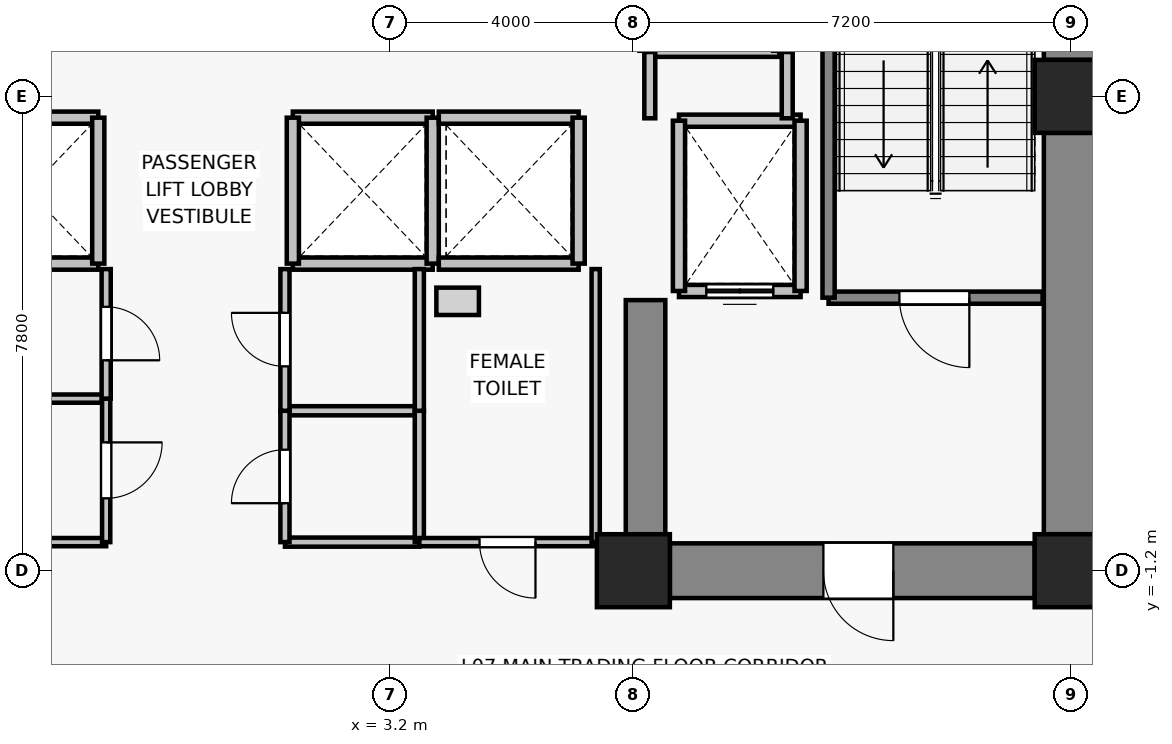
"""IFC4 building model, lengths in metres.
Left out: names, types, materials, properties, quantities, classifications, styles, units other than length and angle.
Written with IfcOpenShell. Run it as: python <this file> out.ifc"""

import sys

from ifc_helpers import new_model, si_unit, direction, frame, frame_2d, origin, origin_2d, place, context, subcontext, project, spatial, rectangle, extrude, source, transform, mapped, element, fill, save


model = new_model("IFC4")
c1 = context("Model", 3, precision=1e-05, world=origin(), true_north=direction((0.0, 1.0)))
c2 = subcontext(c1, "Body", "Model", "MODEL_VIEW")
j1 = project(units=[si_unit("LENGTHUNIT", "METRE"), si_unit("PLANEANGLEUNIT", "RADIAN")], contexts=[c1])
p1 = place(None, origin())
s1 = spatial("IfcSite", under=j1, at=p1, CompositionType="ELEMENT")
p2 = place(p1, origin())
s2 = spatial("IfcBuilding", under=s1, at=p2, CompositionType="ELEMENT")
p3 = place(p2, frame((0.0, 0.0, 30.7)))
s3 = spatial("IfcBuildingStorey", under=s2, at=p3, CompositionType="ELEMENT", Elevation=30.7)
for number, where, z_axis, x_axis in (
    (1, (7.2, -1.2, 0.0), (0.0, 0.0, 1.0), (1.0, 0.0, 0.0)),
    (2, (14.4, -1.2, 0.0), (0.0, 0.0, 1.0), (1.0, 0.0, 0.0)),
    (3, (14.4, 6.6, 0.0), (0.0, 0.0, 1.0), (1.0, 0.0, 0.0)),
):
    element("IfcColumn", number, at=place(p3, frame(where, z_axis=z_axis, x_axis=x_axis)), inside=s3, PredefinedType="COLUMN", context=c2, shape_type="SweptSolid", body=[
        extrude(rectangle(XDim=1.2, YDim=1.2, at=origin_2d()), origin(), (0.0, 0.0, 1.0), 3.3),
    ])
p4 = place(p3, frame((14.4, -0.6, 0.0), z_axis=(0.0, 0.0, 1.0), x_axis=(0.0, 1.0, 0.0)))
e4 = element("IfcWall", 4, at=p4, inside=s3, PredefinedType="SHEAR", context=c2, shape_type="SweptSolid", body=[
    extrude(rectangle(XDim=6.6, YDim=0.9, at=frame_2d((3.3, 0.0))), origin(), (0.0, 0.0, 1.0), 3.075),
])
p5 = place(p3, frame((14.4, 7.2, 0.0), z_axis=(0.0, 0.0, 1.0), x_axis=(0.0, 1.0, 0.0)))
e5 = element("IfcWall", 5, at=p5, inside=s3, PredefinedType="SHEAR", context=c2, shape_type="SweptSolid", body=[
    extrude(rectangle(XDim=5.7, YDim=0.9, at=frame_2d((2.85, 0.0))), origin(), (0.0, 0.0, 1.0), 3.075),
])
p6 = place(p3, frame((13.8, -1.2, 0.0), z_axis=(0.0, 0.0, 1.0), x_axis=(-1.0, 0.0, 0.0)))
e6 = element("IfcWall", 6, at=p6, inside=s3, PredefinedType="SHEAR", context=c2, shape_type="SweptSolid", body=[
    extrude(rectangle(XDim=6.0, YDim=0.9, at=frame_2d((3.0, 0.0))), origin(), (0.0, 0.0, 1.0), 3.075),
])
p7 = place(p6, frame((2.325, 0.0, 0.0)))
e7 = element("IfcOpeningElement", 7, at=p7, cuts=e6, PredefinedType="OPENING", context=c2, shape_type="SweptSolid", body=[
    extrude(rectangle(XDim=1.15, YDim=2.15, at=frame_2d((0.575, 1.075))), frame((0.0, 0.46, 0.0), z_axis=(0.0, -1.0, 0.0), x_axis=(1.0, 0.0, 0.0)), (0.0, 0.0, 1.0), 0.92),
])
p8 = place(p3, frame((7.4, -0.75, 0.0), z_axis=(0.0, 0.0, 1.0), x_axis=(0.0, 1.0, 0.0)))
e8 = element("IfcWall", 8, at=p8, inside=s3, PredefinedType="SHEAR", context=c2, shape_type="SweptSolid", body=[
    extrude(rectangle(XDim=4.0, YDim=0.65, at=frame_2d((2.0, 0.0))), origin(), (0.0, 0.0, 1.0), 3.075),
])
p9 = place(p3, frame((9.95, 3.4, 0.0), z_axis=(0.0, 0.0, 1.0), x_axis=(-1.0, 0.0, 0.0)))
e9 = element("IfcWall", 9, at=p9, inside=s3, PredefinedType="SOLIDWALL", context=c2, shape_type="SweptSolid", body=[
    extrude(rectangle(XDim=2.0, YDim=0.2, at=frame_2d((1.0, 0.0))), origin(), (0.0, 0.0, 1.0), 3.075),
])
p10 = place(p9, frame((0.45, 0.0, 0.0)))
e10 = element("IfcOpeningElement", 10, at=p10, cuts=e9, PredefinedType="OPENING", context=c2, shape_type="SweptSolid", body=[
    extrude(rectangle(XDim=1.1, YDim=2.2, at=frame_2d((0.55, 1.1))), frame((0.0, 0.11, 0.0), z_axis=(0.0, -1.0, 0.0), x_axis=(1.0, 0.0, 0.0)), (0.0, 0.0, 1.0), 0.22),
])
p11 = place(p3, frame((7.95, 6.2, 0.0), z_axis=(0.0, 0.0, 1.0), x_axis=(1.0, 0.0, 0.0)))
e11 = element("IfcWall", 11, at=p11, inside=s3, PredefinedType="SOLIDWALL", context=c2, shape_type="SweptSolid", body=[
    extrude(rectangle(XDim=2.0, YDim=0.2, at=frame_2d((1.0, 0.0))), origin(), (0.0, 0.0, 1.0), 3.075),
])
for number, where, z_axis, x_axis in (
    (12, (7.95, 3.4, 0.0), (0.0, 0.0, 1.0), (0.0, 1.0, 0.0)),
    (13, (9.95, 6.2, 0.0), (0.0, 0.0, 1.0), (0.0, -1.0, 0.0)),
):
    element("IfcWall", number, at=place(p3, frame(where, z_axis=z_axis, x_axis=x_axis)), inside=s3, PredefinedType="SOLIDWALL", context=c2, shape_type="SweptSolid", body=[
        extrude(rectangle(XDim=2.8, YDim=0.2, at=frame_2d((1.4, 0.0))), origin(), (0.0, 0.0, 1.0), 3.075),
    ])
for number, where, z_axis, x_axis in (
    (14, (-1.6, 3.85, 0.0), (0.0, 0.0, 1.0), (-1.0, 0.0, 0.0)),
    (15, (-3.9, 6.25, 0.0), (0.0, 0.0, 1.0), (1.0, 0.0, 0.0)),
):
    element("IfcWall", number, at=place(p3, frame(where, z_axis=z_axis, x_axis=x_axis)), inside=s3, PredefinedType="SOLIDWALL", context=c2, shape_type="SweptSolid", body=[
        extrude(rectangle(XDim=2.3, YDim=0.2, at=frame_2d((1.15, 0.0))), origin(), (0.0, 0.0, 1.0), 3.075),
    ])
p12 = place(p3, frame((-1.6, 6.25, 0.0), z_axis=(0.0, 0.0, 1.0), x_axis=(0.0, -1.0, 0.0)))
e16 = element("IfcWall", 16, at=p12, inside=s3, PredefinedType="SOLIDWALL", context=c2, shape_type="SweptSolid", body=[
    extrude(rectangle(XDim=2.4, YDim=0.2, at=frame_2d((1.2, 0.0))), origin(), (0.0, 0.0, 1.0), 3.075),
])
for number, where, z_axis, x_axis in (
    (17, (3.9, 3.85, 0.0), (0.0, 0.0, 1.0), (-1.0, 0.0, 0.0)),
    (18, (1.6, 6.25, 0.0), (0.0, 0.0, 1.0), (1.0, 0.0, 0.0)),
):
    element("IfcWall", number, at=place(p3, frame(where, z_axis=z_axis, x_axis=x_axis)), inside=s3, PredefinedType="SOLIDWALL", context=c2, shape_type="SweptSolid", body=[
        extrude(rectangle(XDim=2.3, YDim=0.2, at=frame_2d((1.15, 0.0))), origin(), (0.0, 0.0, 1.0), 3.075),
    ])
for number, where, z_axis, x_axis in (
    (19, (1.6, 3.85, 0.0), (0.0, 0.0, 1.0), (0.0, 1.0, 0.0)),
    (20, (3.9, 6.25, 0.0), (0.0, 0.0, 1.0), (0.0, -1.0, 0.0)),
):
    element("IfcWall", number, at=place(p3, frame(where, z_axis=z_axis, x_axis=x_axis)), inside=s3, PredefinedType="SOLIDWALL", context=c2, shape_type="SweptSolid", body=[
        extrude(rectangle(XDim=2.4, YDim=0.2, at=frame_2d((1.2, 0.0))), origin(), (0.0, 0.0, 1.0), 3.075),
    ])
for number, where, z_axis, x_axis in (
    (21, (6.3, 3.85, 0.0), (0.0, 0.0, 1.0), (-1.0, 0.0, 0.0)),
    (22, (4.0, 6.25, 0.0), (0.0, 0.0, 1.0), (1.0, 0.0, 0.0)),
):
    element("IfcWall", number, at=place(p3, frame(where, z_axis=z_axis, x_axis=x_axis)), inside=s3, PredefinedType="SOLIDWALL", context=c2, shape_type="SweptSolid", body=[
        extrude(rectangle(XDim=2.3, YDim=0.2, at=frame_2d((1.15, 0.0))), origin(), (0.0, 0.0, 1.0), 3.075),
    ])
p13 = place(p3, frame((6.3, 6.25, 0.0), z_axis=(0.0, 0.0, 1.0), x_axis=(0.0, -1.0, 0.0)))
e23 = element("IfcWall", 23, at=p13, inside=s3, PredefinedType="SOLIDWALL", context=c2, shape_type="SweptSolid", body=[
    extrude(rectangle(XDim=2.4, YDim=0.2, at=frame_2d((1.2, 0.0))), origin(), (0.0, 0.0, 1.0), 3.075),
])
p14 = place(p3, frame((9.6, 7.35, 0.0), z_axis=(0.0, 0.0, 1.0), x_axis=(-1.0, 0.0, 0.0)))
e24 = element("IfcWall", 24, at=p14, inside=s3, PredefinedType="SOLIDWALL", context=c2, shape_type="SweptSolid", body=[
    extrude(rectangle(XDim=2.2, YDim=0.2, at=frame_2d((1.1, 0.0))), origin(), (0.0, 0.0, 1.0), 2.465),
])
p15 = place(p3, frame((13.93, 3.29, 0.0), z_axis=(0.0, 0.0, 1.0), x_axis=(-1.0, 0.0, 0.0)))
e25 = element("IfcWall", 25, at=p15, inside=s3, PredefinedType="SOLIDWALL", context=c2, shape_type="SweptSolid", body=[
    extrude(rectangle(XDim=3.52, YDim=0.2, at=frame_2d((1.76, 0.0))), origin(), (0.0, 0.0, 1.0), 3.075),
])
p16 = place(p15, frame((1.205, 0.0, 0.0)))
e26 = element("IfcOpeningElement", 26, at=p16, cuts=e25, PredefinedType="OPENING", context=c2, shape_type="SweptSolid", body=[
    extrude(rectangle(XDim=1.15, YDim=2.15, at=frame_2d((0.575, 1.075))), frame((0.0, 0.11, 0.0), z_axis=(0.0, -1.0, 0.0), x_axis=(1.0, 0.0, 0.0)), (0.0, 0.0, 1.0), 0.22),
])
p17 = place(p3, frame((10.41, 3.29, 0.0), z_axis=(0.0, 0.0, 1.0), x_axis=(0.0, 1.0, 0.0)))
e27 = element("IfcWall", 27, at=p17, inside=s3, PredefinedType="SOLIDWALL", context=c2, shape_type="SweptSolid", body=[
    extrude(rectangle(XDim=8.84, YDim=0.2, at=frame_2d((4.42, 0.0))), origin(), (0.0, 0.0, 1.0), 3.075),
])
p18 = place(p3, frame((7.47, 6.24, 0.0), z_axis=(0.0, 0.0, 1.0), x_axis=(0.0, 1.0, 0.0)))
e28 = element("IfcWall", 28, at=p18, inside=s3, PredefinedType="PARTITIONING", context=c2, shape_type="SweptSolid", body=[
    extrude(rectangle(XDim=1.09, YDim=0.18, at=frame_2d((0.545, 0.0))), origin(), (0.0, 0.0, 1.0), 2.465),
])
p19 = place(p3, frame((9.73, 7.33, 0.0), z_axis=(0.0, 0.0, 1.0), x_axis=(0.0, -1.0, 0.0)))
e29 = element("IfcWall", 29, at=p19, inside=s3, PredefinedType="PARTITIONING", context=c2, shape_type="SweptSolid", body=[
    extrude(rectangle(XDim=1.09, YDim=0.18, at=frame_2d((0.545, 0.0))), origin(), (0.0, 0.0, 1.0), 3.075),
])
for number, where, z_axis, x_axis in (
    (30, (-1.47, -0.73, 0.0), (0.0, 0.0, 1.0), (-1.0, 0.0, 0.0)),
    (31, (-3.47, 1.63, 0.0), (0.0, 0.0, 1.0), (1.0, 0.0, 0.0)),
):
    element("IfcWall", number, at=place(p3, frame(where, z_axis=z_axis, x_axis=x_axis)), inside=s3, PredefinedType="PARTITIONING", context=c2, shape_type="SweptSolid", body=[
        extrude(rectangle(XDim=2.0, YDim=0.135, at=frame_2d((1.0, 0.0))), origin(), (0.0, 0.0, 1.0), 3.075),
    ])
p20 = place(p3, frame((-1.47, 1.63, 0.0), z_axis=(0.0, 0.0, 1.0), x_axis=(0.0, -1.0, 0.0)))
e32 = element("IfcWall", 32, at=p20, inside=s3, PredefinedType="PARTITIONING", context=c2, shape_type="SweptSolid", body=[
    extrude(rectangle(XDim=2.36, YDim=0.135, at=frame_2d((1.18, 0.0))), origin(), (0.0, 0.0, 1.0), 3.075),
])
p21 = place(p20, frame((0.72, 0.0, 0.0)))
e33 = element("IfcOpeningElement", 33, at=p21, cuts=e32, PredefinedType="OPENING", context=c2, shape_type="SweptSolid", body=[
    extrude(rectangle(XDim=0.92, YDim=2.1, at=frame_2d((0.46, 1.05))), frame((0.0, 0.077, 0.0), z_axis=(0.0, -1.0, 0.0), x_axis=(1.0, 0.0, 0.0)), (0.0, 0.0, 1.0), 0.155),
])
p22 = place(p3, frame((-1.47, 3.76, 0.0), z_axis=(0.0, 0.0, 1.0), x_axis=(0.0, -1.0, 0.0)))
e34 = element("IfcWall", 34, at=p22, inside=s3, PredefinedType="PARTITIONING", context=c2, shape_type="SweptSolid", body=[
    extrude(rectangle(XDim=2.13, YDim=0.15, at=frame_2d((1.065, 0.0))), origin(), (0.0, 0.0, 1.0), 3.075),
])
p23 = place(p22, frame((0.62, 0.0, 0.0)))
e35 = element("IfcOpeningElement", 35, at=p23, cuts=e34, PredefinedType="OPENING", context=c2, shape_type="SweptSolid", body=[
    extrude(rectangle(XDim=0.88, YDim=2.1, at=frame_2d((0.44, 1.05))), frame((0.0, 0.085, 0.0), z_axis=(0.0, -1.0, 0.0), x_axis=(1.0, 0.0, 0.0)), (0.0, 0.0, 1.0), 0.17),
])
for number, where, z_axis, x_axis in (
    (36, (3.68, -0.73, 0.0), (0.0, 0.0, 1.0), (-1.0, 0.0, 0.0)),
    (37, (1.47, 1.43, 0.0), (0.0, 0.0, 1.0), (1.0, 0.0, 0.0)),
):
    element("IfcWall", number, at=place(p3, frame(where, z_axis=z_axis, x_axis=x_axis)), inside=s3, PredefinedType="PARTITIONING", context=c2, shape_type="SweptSolid", body=[
        extrude(rectangle(XDim=2.21, YDim=0.15, at=frame_2d((1.105, 0.0))), origin(), (0.0, 0.0, 1.0), 3.075),
    ])
p24 = place(p3, frame((1.47, -0.73, 0.0), z_axis=(0.0, 0.0, 1.0), x_axis=(0.0, 1.0, 0.0)))
e38 = element("IfcWall", 38, at=p24, inside=s3, PredefinedType="PARTITIONING", context=c2, shape_type="SweptSolid", body=[
    extrude(rectangle(XDim=2.16, YDim=0.15, at=frame_2d((1.08, 0.0))), origin(), (0.0, 0.0, 1.0), 3.075),
])
p25 = place(p24, frame((0.64, 0.0, 0.0)))
e39 = element("IfcOpeningElement", 39, at=p25, cuts=e38, PredefinedType="OPENING", context=c2, shape_type="SweptSolid", body=[
    extrude(rectangle(XDim=0.88, YDim=2.1, at=frame_2d((0.44, 1.05))), frame((0.0, 0.085, 0.0), z_axis=(0.0, -1.0, 0.0), x_axis=(1.0, 0.0, 0.0)), (0.0, 0.0, 1.0), 0.17),
])
p26 = place(p3, frame((3.68, 1.43, 0.0), z_axis=(0.0, 0.0, 1.0), x_axis=(0.0, -1.0, 0.0)))
e40 = element("IfcWall", 40, at=p26, inside=s3, PredefinedType="PARTITIONING", context=c2, shape_type="SweptSolid", body=[
    extrude(rectangle(XDim=2.16, YDim=0.15, at=frame_2d((1.08, 0.0))), origin(), (0.0, 0.0, 1.0), 3.075),
])
p27 = place(p3, frame((1.47, 1.43, 0.0), z_axis=(0.0, 0.0, 1.0), x_axis=(0.0, 1.0, 0.0)))
e41 = element("IfcWall", 41, at=p27, inside=s3, PredefinedType="PARTITIONING", context=c2, shape_type="SweptSolid", body=[
    extrude(rectangle(XDim=2.33, YDim=0.15, at=frame_2d((1.165, 0.0))), origin(), (0.0, 0.0, 1.0), 3.075),
])
p28 = place(p27, frame((0.73, 0.0, 0.0)))
e42 = element("IfcOpeningElement", 42, at=p28, cuts=e41, PredefinedType="OPENING", context=c2, shape_type="SweptSolid", body=[
    extrude(rectangle(XDim=0.88, YDim=2.15, at=frame_2d((0.44, 1.075))), frame((0.0, 0.085, 0.0), z_axis=(0.0, -1.0, 0.0), x_axis=(1.0, 0.0, 0.0)), (0.0, 0.0, 1.0), 0.17),
])
p29 = place(p3, frame((3.68, 3.76, 0.0), z_axis=(0.0, 0.0, 1.0), x_axis=(0.0, -1.0, 0.0)))
e43 = element("IfcWall", 43, at=p29, inside=s3, PredefinedType="PARTITIONING", context=c2, shape_type="SweptSolid", body=[
    extrude(rectangle(XDim=2.33, YDim=0.15, at=frame_2d((1.165, 0.0))), origin(), (0.0, 0.0, 1.0), 3.075),
])
p30 = place(p3, frame((6.58, -0.73, 0.0), z_axis=(0.0, 0.0, 1.0), x_axis=(-1.0, 0.0, 0.0)))
e44 = element("IfcWall", 44, at=p30, inside=s3, PredefinedType="PARTITIONING", context=c2, shape_type="SweptSolid", body=[
    extrude(rectangle(XDim=2.9, YDim=0.135, at=frame_2d((1.45, 0.0))), origin(), (0.0, 0.0, 1.0), 3.075),
])
p31 = place(p30, frame((0.99, 0.0, 0.0)))
e45 = element("IfcOpeningElement", 45, at=p31, cuts=e44, PredefinedType="OPENING", context=c2, shape_type="SweptSolid", body=[
    extrude(rectangle(XDim=0.92, YDim=2.1, at=frame_2d((0.46, 1.05))), frame((0.0, 0.077, 0.0), z_axis=(0.0, -1.0, 0.0), x_axis=(1.0, 0.0, 0.0)), (0.0, 0.0, 1.0), 0.155),
])
p32 = place(p3, frame((6.58, 3.76, 0.0), z_axis=(0.0, 0.0, 1.0), x_axis=(0.0, -1.0, 0.0)))
e46 = element("IfcWall", 46, at=p32, inside=s3, PredefinedType="PARTITIONING", context=c2, shape_type="SweptSolid", body=[
    extrude(rectangle(XDim=4.49, YDim=0.135, at=frame_2d((2.245, 0.0))), origin(), (0.0, 0.0, 1.0), 3.075),
])
m1 = source(origin(), c2, "Body", "SweptSolid", [
    extrude(rectangle(XDim=1.1, YDim=2.2, at=frame_2d((0.55, 1.1))), frame((0.0, 0.025, 0.0), z_axis=(0.0, -1.0, 0.0), x_axis=(1.0, 0.0, 0.0)), (0.0, 0.0, 1.0), 0.05),
])
p33 = place(p10, origin())
e47 = element("IfcDoor", 47, at=p33, inside=s3, OperationType="DOUBLE_DOOR_SLIDING", PredefinedType="DOOR", context=c2, shape_type="MappedRepresentation", body=[
    mapped(m1, transform((0.0, 0.0, 0.0), x_axis=(1.0, 0.0, 0.0), y_axis=(0.0, 1.0, 0.0), z_axis=(0.0, 0.0, 1.0), scale=1.0)),
])
fill(e10, e47)
m2 = source(origin(), c2, "Body", "SweptSolid", [
    extrude(rectangle(XDim=1.15, YDim=2.15, at=frame_2d((0.575, 1.075))), frame((0.0, 0.025, 0.0), z_axis=(0.0, -1.0, 0.0), x_axis=(1.0, 0.0, 0.0)), (0.0, 0.0, 1.0), 0.05),
])
p34 = place(p16, origin())
e48 = element("IfcDoor", 48, at=p34, inside=s3, OperationType="SINGLE_SWING_LEFT", PredefinedType="DOOR", context=c2, shape_type="MappedRepresentation", body=[
    mapped(m2, transform((0.0, 0.0, 0.0), x_axis=(1.0, 0.0, 0.0), y_axis=(0.0, 1.0, 0.0), z_axis=(0.0, 0.0, 1.0), scale=1.0)),
])
fill(e26, e48)
p35 = place(p7, origin())
e49 = element("IfcDoor", 49, at=p35, inside=s3, OperationType="SINGLE_SWING_LEFT", PredefinedType="DOOR", context=c2, shape_type="MappedRepresentation", body=[
    mapped(m2, transform((0.0, 0.0, 0.0), x_axis=(1.0, 0.0, 0.0), y_axis=(0.0, 1.0, 0.0), z_axis=(0.0, 0.0, 1.0), scale=1.0)),
])
fill(e7, e49)
m3 = source(origin(), c2, "Body", "SweptSolid", [
    extrude(rectangle(XDim=0.92, YDim=2.1, at=frame_2d((0.46, 1.05))), frame((0.0, 0.025, 0.0), z_axis=(0.0, -1.0, 0.0), x_axis=(1.0, 0.0, 0.0)), (0.0, 0.0, 1.0), 0.05),
])
p36 = place(p21, origin())
e50 = element("IfcDoor", 50, at=p36, inside=s3, OperationType="SINGLE_SWING_LEFT", PredefinedType="DOOR", context=c2, shape_type="MappedRepresentation", body=[
    mapped(m3, transform((0.0, 0.0, 0.0), x_axis=(1.0, 0.0, 0.0), y_axis=(0.0, 1.0, 0.0), z_axis=(0.0, 0.0, 1.0), scale=1.0)),
])
fill(e33, e50)
m4 = source(origin(), c2, "Body", "SweptSolid", [
    extrude(rectangle(XDim=0.88, YDim=2.1, at=frame_2d((0.44, 1.05))), frame((0.0, 0.025, 0.0), z_axis=(0.0, -1.0, 0.0), x_axis=(1.0, 0.0, 0.0)), (0.0, 0.0, 1.0), 0.05),
])
p37 = place(p23, origin())
e51 = element("IfcDoor", 51, at=p37, inside=s3, OperationType="SINGLE_SWING_RIGHT", PredefinedType="DOOR", context=c2, shape_type="MappedRepresentation", body=[
    mapped(m4, transform((0.0, 0.0, 0.0), x_axis=(1.0, 0.0, 0.0), y_axis=(0.0, 1.0, 0.0), z_axis=(0.0, 0.0, 1.0), scale=1.0)),
])
fill(e35, e51)
p38 = place(p25, origin())
e52 = element("IfcDoor", 52, at=p38, inside=s3, OperationType="SINGLE_SWING_LEFT", PredefinedType="DOOR", context=c2, shape_type="MappedRepresentation", body=[
    mapped(m4, transform((0.0, 0.0, 0.0), x_axis=(1.0, 0.0, 0.0), y_axis=(0.0, 1.0, 0.0), z_axis=(0.0, 0.0, 1.0), scale=1.0)),
])
fill(e39, e52)
m5 = source(origin(), c2, "Body", "SweptSolid", [
    extrude(rectangle(XDim=0.88, YDim=2.15, at=frame_2d((0.44, 1.075))), frame((0.0, 0.025, 0.0), z_axis=(0.0, -1.0, 0.0), x_axis=(1.0, 0.0, 0.0)), (0.0, 0.0, 1.0), 0.05),
])
p39 = place(p28, origin())
e53 = element("IfcDoor", 53, at=p39, inside=s3, OperationType="SINGLE_SWING_RIGHT", PredefinedType="DOOR", context=c2, shape_type="MappedRepresentation", body=[
    mapped(m5, transform((0.0, 0.0, 0.0), x_axis=(1.0, 0.0, 0.0), y_axis=(0.0, 1.0, 0.0), z_axis=(0.0, 0.0, 1.0), scale=1.0)),
])
fill(e42, e53)
p40 = place(p31, origin())
e54 = element("IfcDoor", 54, at=p40, inside=s3, OperationType="SINGLE_SWING_LEFT", PredefinedType="DOOR", context=c2, shape_type="MappedRepresentation", body=[
    mapped(m3, transform((0.0, 0.0, 0.0), x_axis=(1.0, 0.0, 0.0), y_axis=(0.0, 1.0, 0.0), z_axis=(0.0, 0.0, 1.0), scale=1.0)),
])
fill(e45, e54)
save(model, sys.argv[1])
